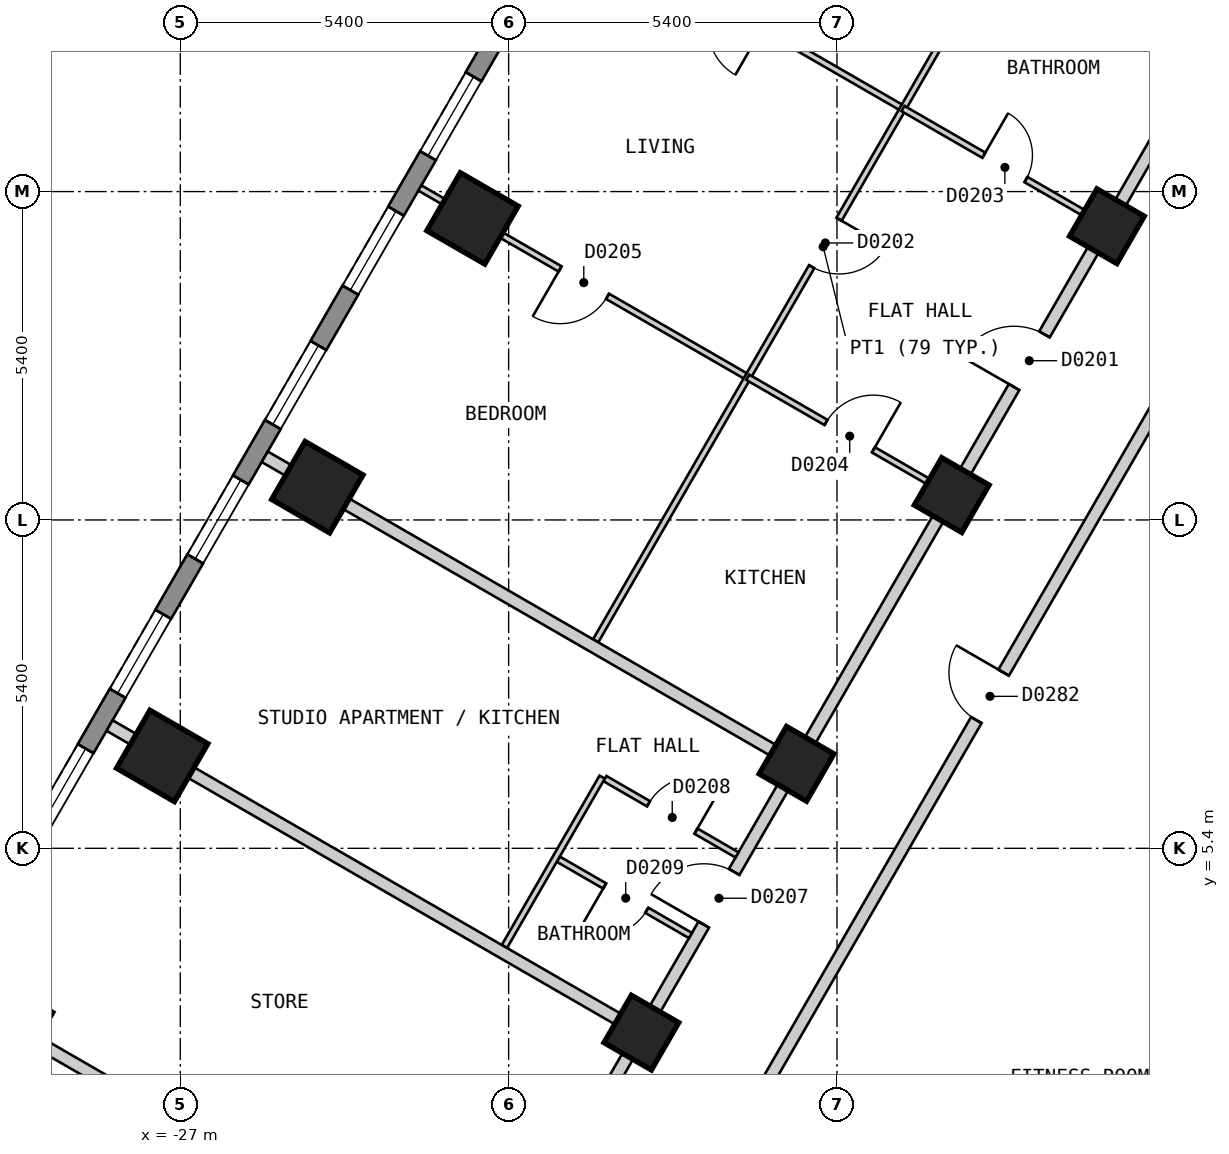
"""IFC4 building model, lengths in metres.
Left out: names, types, materials, properties, quantities, classifications, styles, units other than length and angle.
Written with IfcOpenShell. Run it as: python <this file> out.ifc"""

import sys

from ifc_helpers import new_model, si_unit, direction, frame, frame_2d, origin, origin_2d, place, context, subcontext, project, spatial, polyline, rectangle, outline, extrude, element, fill, save


model = new_model("IFC4")
c1 = context("Model", 3, precision=1e-05, world=origin(), true_north=direction((0.0, 1.0)))
c2 = subcontext(c1, "Body", "Model", "MODEL_VIEW")
j1 = project(units=[si_unit("LENGTHUNIT", "METRE"), si_unit("PLANEANGLEUNIT", "RADIAN")], contexts=[c1])
p1 = place(None, origin())
s1 = spatial("IfcSite", under=j1, at=p1, CompositionType="ELEMENT")
p2 = place(p1, origin())
s2 = spatial("IfcBuilding", under=s1, at=p2, CompositionType="ELEMENT")
p3 = place(p2, frame((0.0, 0.0, 47.4)))
s3 = spatial("IfcBuildingStorey", under=s2, at=p3, CompositionType="ELEMENT", Elevation=47.4)
for number, where, z_axis, x_axis in (
    (1, (-22.194, 15.759, 0.0), (0.0, 0.0, 1.0), (-0.5, -0.866, 0.0)),
    (2, (-24.746, 11.339, 0.0), (0.0, 0.0, 1.0), (-0.5, -0.866, 0.0)),
    (3, (-27.298, 6.919, 0.0), (0.0, 0.0, 1.0), (-0.5, -0.866, 0.0)),
    (4, (-29.849, 2.499, 0.0), (0.0, 0.0, 1.0), (-0.5, -0.866, 0.0)),
):
    element("IfcColumn", number, at=place(p3, frame(where, z_axis=z_axis, x_axis=x_axis)), inside=s3, PredefinedType="COLUMN", context=c2, shape_type="SweptSolid", body=[
        extrude(rectangle(XDim=1.1, YDim=1.1, at=origin_2d()), origin(), (0.0, 0.0, 1.0), 3.0),
    ])
for number, where, z_axis, x_axis in (
    (5, (-11.761, 15.63, 0.0), (0.0, 0.0, 1.0), (-0.5, -0.866, 0.0)),
    (6, (-14.313, 11.209, 0.0), (0.0, 0.0, 1.0), (-0.5, -0.866, 0.0)),
    (7, (-16.865, 6.789, 0.0), (0.0, 0.0, 1.0), (-0.5, -0.866, 0.0)),
    (8, (-19.417, 2.369, 0.0), (0.0, 0.0, 1.0), (-0.5, -0.866, 0.0)),
):
    element("IfcColumn", number, at=place(p3, frame(where, z_axis=z_axis, x_axis=x_axis)), inside=s3, PredefinedType="COLUMN", context=c2, shape_type="SweptSolid", body=[
        extrude(rectangle(XDim=0.9, YDim=0.9, at=origin_2d()), origin(), (0.0, 0.0, 1.0), 3.0),
    ])
p4 = place(p3, frame((-17.71, 25.825, 0.0), z_axis=(0.0, 0.0, 1.0), x_axis=(-0.500001938803, -0.866024284413, 0.0)))
e9 = element("IfcWall", 9, at=p4, inside=s3, PredefinedType="SOLIDWALL", context=c2, shape_type="SweptSolid", body=[
    extrude(outline(polyline([(0.0, -0.15), (27.02, -0.15), (26.94, 0.15), (0.08, 0.15), (0.0, -0.15)])), origin(), (0.0, 0.0, 1.0), 2.7),
])
p5 = place(p4, frame((1.277, 0.0, 0.15)))
e10 = element("IfcOpeningElement", 10, at=p5, cuts=e9, PredefinedType="OPENING", context=c2, shape_type="SweptSolid", body=[
    extrude(rectangle(XDim=1.5, YDim=2.1, at=frame_2d((0.75, 1.05))), frame((0.0, 0.16, 0.0), z_axis=(0.0, -1.0, 0.0), x_axis=(1.0, 0.0, 0.0)), (0.0, 0.0, 1.0), 0.32),
])
p6 = place(p4, frame((3.829, 0.0, 0.15)))
e11 = element("IfcOpeningElement", 11, at=p6, cuts=e9, PredefinedType="OPENING", context=c2, shape_type="SweptSolid", body=[
    extrude(rectangle(XDim=1.5, YDim=2.1, at=frame_2d((0.75, 1.05))), frame((0.0, 0.16, 0.0), z_axis=(0.0, -1.0, 0.0), x_axis=(1.0, 0.0, 0.0)), (0.0, 0.0, 1.0), 0.32),
])
p7 = place(p4, frame((6.382, 0.0, 0.15)))
e12 = element("IfcOpeningElement", 12, at=p7, cuts=e9, PredefinedType="OPENING", context=c2, shape_type="SweptSolid", body=[
    extrude(rectangle(XDim=1.5, YDim=2.1, at=frame_2d((0.75, 1.05))), frame((0.0, 0.16, 0.0), z_axis=(0.0, -1.0, 0.0), x_axis=(1.0, 0.0, 0.0)), (0.0, 0.0, 1.0), 0.32),
])
p8 = place(p4, frame((8.933, 0.0, 0.15)))
e13 = element("IfcOpeningElement", 13, at=p8, cuts=e9, PredefinedType="OPENING", context=c2, shape_type="SweptSolid", body=[
    extrude(rectangle(XDim=1.5, YDim=2.1, at=frame_2d((0.75, 1.05))), frame((0.0, 0.16, 0.0), z_axis=(0.0, -1.0, 0.0), x_axis=(1.0, 0.0, 0.0)), (0.0, 0.0, 1.0), 0.32),
])
p9 = place(p4, frame((11.485, 0.0, 0.15)))
e14 = element("IfcOpeningElement", 14, at=p9, cuts=e9, PredefinedType="OPENING", context=c2, shape_type="SweptSolid", body=[
    extrude(rectangle(XDim=1.5, YDim=2.1, at=frame_2d((0.75, 1.05))), frame((0.0, 0.16, 0.0), z_axis=(0.0, -1.0, 0.0), x_axis=(1.0, 0.0, 0.0)), (0.0, 0.0, 1.0), 0.32),
])
p10 = place(p4, frame((14.037, 0.0, 0.15)))
e15 = element("IfcOpeningElement", 15, at=p10, cuts=e9, PredefinedType="OPENING", context=c2, shape_type="SweptSolid", body=[
    extrude(rectangle(XDim=1.5, YDim=2.1, at=frame_2d((0.75, 1.05))), frame((0.0, 0.16, 0.0), z_axis=(0.0, -1.0, 0.0), x_axis=(1.0, 0.0, 0.0)), (0.0, 0.0, 1.0), 0.32),
])
p11 = place(p4, frame((16.589, 0.0, 0.15)))
e16 = element("IfcOpeningElement", 16, at=p11, cuts=e9, PredefinedType="OPENING", context=c2, shape_type="SweptSolid", body=[
    extrude(rectangle(XDim=1.5, YDim=2.1, at=frame_2d((0.75, 1.05))), frame((0.0, 0.16, 0.0), z_axis=(0.0, -1.0, 0.0), x_axis=(1.0, 0.0, 0.0)), (0.0, 0.0, 1.0), 0.32),
])
p12 = place(p4, frame((19.141, 0.0, 0.15)))
e17 = element("IfcOpeningElement", 17, at=p12, cuts=e9, PredefinedType="OPENING", context=c2, shape_type="SweptSolid", body=[
    extrude(rectangle(XDim=1.5, YDim=2.1, at=frame_2d((0.75, 1.05))), frame((0.0, 0.16, 0.0), z_axis=(0.0, -1.0, 0.0), x_axis=(1.0, 0.0, 0.0)), (0.0, 0.0, 1.0), 0.32),
])
p13 = place(p4, frame((21.693, 0.0, 0.15)))
e18 = element("IfcOpeningElement", 18, at=p13, cuts=e9, PredefinedType="OPENING", context=c2, shape_type="SweptSolid", body=[
    extrude(rectangle(XDim=1.5, YDim=2.1, at=frame_2d((0.75, 1.05))), frame((0.0, 0.16, 0.0), z_axis=(0.0, -1.0, 0.0), x_axis=(1.0, 0.0, 0.0)), (0.0, 0.0, 1.0), 0.32),
])
p14 = place(p4, frame((24.244, 0.0, 0.15)))
e19 = element("IfcOpeningElement", 19, at=p14, cuts=e9, PredefinedType="OPENING", context=c2, shape_type="SweptSolid", body=[
    extrude(rectangle(XDim=1.5, YDim=2.1, at=frame_2d((0.75, 1.05))), frame((0.0, 0.16, 0.0), z_axis=(0.0, -1.0, 0.0), x_axis=(1.0, 0.0, 0.0)), (0.0, 0.0, 1.0), 0.32),
])
p15 = place(p3, frame((-18.244, -0.001, 0.0), z_axis=(0.0, 0.0, 1.0), x_axis=(0.499962999376, 0.866046765051, 0.0)))
e20 = element("IfcWall", 20, at=p15, inside=s3, PredefinedType="PARTITIONING", context=c2, shape_type="SweptSolid", body=[
    extrude(rectangle(XDim=18.245, YDim=0.2, at=frame_2d((9.123, 0.0))), origin(), (0.0, 0.0, 1.0), 2.7),
])
p16 = place(p15, frame((8.672, 0.0, 0.0)))
e21 = element("IfcOpeningElement", 21, at=p16, cuts=e20, PredefinedType="OPENING", context=c2, shape_type="SweptSolid", body=[
    extrude(rectangle(XDim=0.9, YDim=2.1, at=frame_2d((0.45, 1.05))), frame((0.0, 0.11, 0.0), z_axis=(0.0, -1.0, 0.0), x_axis=(1.0, 0.0, 0.0)), (0.0, 0.0, 1.0), 0.22),
])
p17 = place(p3, frame((-20.727, 0.099, 0.0), z_axis=(0.0, 0.0, 1.0), x_axis=(0.499993204491, 0.866029327138, 0.0)))
e22 = element("IfcWall", 22, at=p17, inside=s3, PredefinedType="PARTITIONING", context=c2, shape_type="SweptSolid", body=[
    extrude(rectangle(XDim=20.554, YDim=0.2, at=frame_2d((10.277, 0.0))), origin(), (0.0, 0.0, 1.0), 2.7),
])
p18 = place(p17, frame((14.88, 0.0, 0.0)))
e23 = element("IfcOpeningElement", 23, at=p18, cuts=e22, PredefinedType="OPENING", context=c2, shape_type="SweptSolid", body=[
    extrude(rectangle(XDim=1.0, YDim=2.1, at=frame_2d((0.5, 1.05))), frame((0.0, 0.11, 0.0), z_axis=(0.0, -1.0, 0.0), x_axis=(1.0, 0.0, 0.0)), (0.0, 0.0, 1.0), 0.22),
])
p19 = place(p17, frame((4.673, 0.0, 0.0)))
e24 = element("IfcOpeningElement", 24, at=p19, cuts=e22, PredefinedType="OPENING", context=c2, shape_type="SweptSolid", body=[
    extrude(rectangle(XDim=1.0, YDim=2.1, at=frame_2d((0.5, 1.05))), frame((0.0, 0.11, 0.0), z_axis=(0.0, -1.0, 0.0), x_axis=(1.0, 0.0, 0.0)), (0.0, 0.0, 1.0), 0.22),
])
p20 = place(p17, frame((0.838, 0.0, 0.0)))
e25 = element("IfcOpeningElement", 25, at=p20, cuts=e22, PredefinedType="OPENING", context=c2, shape_type="SweptSolid", body=[
    extrude(rectangle(XDim=0.8, YDim=2.1, at=frame_2d((0.4, 1.05))), frame((0.0, 0.11, 0.0), z_axis=(0.0, -1.0, 0.0), x_axis=(1.0, 0.0, 0.0)), (0.0, 0.0, 1.0), 0.22),
])
p21 = place(p3, frame((-20.017, 6.547, 0.0), z_axis=(0.0, 0.0, 1.0), x_axis=(0.865940918122, -0.500146304917, 0.0)))
e26 = element("IfcWall", 26, at=p21, inside=s3, PredefinedType="PARTITIONING", context=c2, shape_type="SweptSolid", body=[
    extrude(rectangle(XDim=2.51, YDim=0.1, at=frame_2d((1.255, 0.0))), origin(), (0.0, 0.0, 1.0), 2.7),
])
p22 = place(p21, frame((0.829, 0.0, 0.0)))
e27 = element("IfcOpeningElement", 27, at=p22, cuts=e26, PredefinedType="OPENING", context=c2, shape_type="SweptSolid", body=[
    extrude(rectangle(XDim=0.9, YDim=2.1, at=frame_2d((0.45, 1.05))), frame((0.0, 0.06, 0.0), z_axis=(0.0, -1.0, 0.0), x_axis=(1.0, 0.0, 0.0)), (0.0, 0.0, 1.0), 0.12),
])
p23 = place(p3, frame((-20.783, 5.221, 0.0), z_axis=(0.0, 0.0, 1.0), x_axis=(0.865958718457, -0.500115484592, 0.0)))
e28 = element("IfcWall", 28, at=p23, inside=s3, PredefinedType="PARTITIONING", context=c2, shape_type="SweptSolid", body=[
    extrude(rectangle(XDim=2.509, YDim=0.1, at=frame_2d((1.255, 0.0))), origin(), (0.0, 0.0, 1.0), 2.7),
])
p24 = place(p23, frame((0.88, 0.0, 0.0)))
e29 = element("IfcOpeningElement", 29, at=p24, cuts=e28, PredefinedType="OPENING", context=c2, shape_type="SweptSolid", body=[
    extrude(rectangle(XDim=0.8, YDim=2.1, at=frame_2d((0.4, 1.05))), frame((0.0, 0.06, 0.0), z_axis=(0.0, -1.0, 0.0), x_axis=(1.0, 0.0, 0.0)), (0.0, 0.0, 1.0), 0.12),
])
p25 = place(p3, frame((-20.508, 20.679, 0.0), z_axis=(0.0, 0.0, 1.0), x_axis=(0.86607068519, -0.499921562103, 0.0)))
e30 = element("IfcWall", 30, at=p25, inside=s3, PredefinedType="PARTITIONING", context=c2, shape_type="SweptSolid", body=[
    extrude(rectangle(XDim=6.227, YDim=0.1, at=frame_2d((3.114, 0.0))), origin(), (0.0, 0.0, 1.0), 2.7),
])
p26 = place(p25, frame((2.663, 0.0, 0.0)))
e31 = element("IfcOpeningElement", 31, at=p26, cuts=e30, PredefinedType="OPENING", context=c2, shape_type="SweptSolid", body=[
    extrude(rectangle(XDim=0.9, YDim=2.1, at=frame_2d((0.45, 1.05))), frame((0.0, 0.06, 0.0), z_axis=(0.0, -1.0, 0.0), x_axis=(1.0, 0.0, 0.0)), (0.0, 0.0, 1.0), 0.12),
])
p27 = place(p3, frame((-23.06, 16.259, 0.0), z_axis=(0.0, 0.0, 1.0), x_axis=(0.86607068519, -0.499921562103, 0.0)))
e32 = element("IfcWall", 32, at=p27, inside=s3, PredefinedType="PARTITIONING", context=c2, shape_type="SweptSolid", body=[
    extrude(rectangle(XDim=6.227, YDim=0.1, at=frame_2d((3.114, 0.0))), origin(), (0.0, 0.0, 1.0), 2.7),
])
p28 = place(p27, frame((2.663, 0.0, 0.0)))
e33 = element("IfcOpeningElement", 33, at=p28, cuts=e32, PredefinedType="OPENING", context=c2, shape_type="SweptSolid", body=[
    extrude(rectangle(XDim=0.9, YDim=2.1, at=frame_2d((0.45, 1.05))), frame((0.0, 0.06, 0.0), z_axis=(0.0, -1.0, 0.0), x_axis=(1.0, 0.0, 0.0)), (0.0, 0.0, 1.0), 0.12),
])
p29 = place(p3, frame((-21.669, 3.787, 0.0), z_axis=(0.0, 0.0, 1.0), x_axis=(0.499913121084, 0.86607555754, 0.0)))
e34 = element("IfcWall", 34, at=p29, inside=s3, PredefinedType="PARTITIONING", context=c2, shape_type="SweptSolid", body=[
    extrude(rectangle(XDim=3.214, YDim=0.1, at=frame_2d((1.607, 0.0))), origin(), (0.0, 0.0, 1.0), 2.7),
])
p30 = place(p3, frame((-20.169, 8.812, 0.0), z_axis=(0.0, 0.0, 1.0), x_axis=(0.499995459772, 0.86602802507, 0.0)))
e35 = element("IfcWall", 35, at=p30, inside=s3, PredefinedType="PARTITIONING", context=c2, shape_type="SweptSolid", body=[
    extrude(rectangle(XDim=14.966, YDim=0.1, at=frame_2d((7.483, 0.0))), origin(), (0.0, 0.0, 1.0), 2.7),
])
p31 = place(p30, frame((7.105, 0.0, 0.0)))
e36 = element("IfcOpeningElement", 36, at=p31, cuts=e35, PredefinedType="OPENING", context=c2, shape_type="SweptSolid", body=[
    extrude(rectangle(XDim=0.9, YDim=2.1, at=frame_2d((0.45, 1.05))), frame((0.0, 0.06, 0.0), z_axis=(0.0, -1.0, 0.0), x_axis=(1.0, 0.0, 0.0)), (0.0, 0.0, 1.0), 0.12),
])
p32 = place(p3, frame((-12.659, 21.926, 0.0), z_axis=(0.0, 0.0, 1.0), x_axis=(0.500025458316, -0.86601070492, 0.0)))
e37 = element("IfcWall", 37, at=p32, inside=s3, PredefinedType="PARTITIONING", context=c2, shape_type="SweptSolid", body=[
    extrude(rectangle(XDim=4.533, YDim=0.2, at=frame_2d((2.267, 0.0))), origin(), (0.0, 0.0, 1.0), 2.7),
])
p33 = place(p3, frame((-28.163, 7.419, 0.0), z_axis=(0.0, 0.0, 1.0), x_axis=(0.866022959057, -0.500004234368, 0.0)))
e38 = element("IfcWall", 38, at=p33, inside=s3, PredefinedType="PARTITIONING", context=c2, shape_type="SweptSolid", body=[
    extrude(rectangle(XDim=10.0, YDim=0.2, at=frame_2d((5.0, 0.0))), origin(), (0.0, 0.0, 1.0), 2.7),
])
p34 = place(p3, frame((-30.716, 2.999, 0.0), z_axis=(0.0, 0.0, 1.0), x_axis=(0.866032775405, -0.499987231761, 0.0)))
e39 = element("IfcWall", 39, at=p34, inside=s3, PredefinedType="PARTITIONING", context=c2, shape_type="SweptSolid", body=[
    extrude(rectangle(XDim=5.8, YDim=0.2, at=frame_2d((2.9, 0.0))), origin(), (0.0, 0.0, 1.0), 2.7),
])
p35 = place(p3, frame((-25.611, 11.839, 0.0), z_axis=(0.0, 0.0, 1.0), x_axis=(0.866022959057, -0.500004234368, 0.0)))
e40 = element("IfcWall", 40, at=p35, inside=s3, PredefinedType="PARTITIONING", context=c2, shape_type="SweptSolid", body=[
    extrude(rectangle(XDim=10.0, YDim=0.2, at=frame_2d((5.0, 0.0))), origin(), (0.0, 0.0, 1.0), 2.7),
])
p36 = place(p3, frame((-15.115, 17.566, 0.0), z_axis=(0.0, 0.0, 1.0), x_axis=(0.866008894869, -0.50002859319, 0.0)))
e41 = element("IfcWall", 41, at=p36, inside=s3, PredefinedType="PARTITIONING", context=c2, shape_type="SweptSolid", body=[
    extrude(rectangle(XDim=3.774, YDim=0.1, at=frame_2d((1.887, 0.0))), origin(), (0.0, 0.0, 1.0), 2.7),
])
p37 = place(p36, frame((1.536, 0.0, 0.0)))
e42 = element("IfcOpeningElement", 42, at=p37, cuts=e41, PredefinedType="OPENING", context=c2, shape_type="SweptSolid", body=[
    extrude(rectangle(XDim=0.8, YDim=2.1, at=frame_2d((0.4, 1.05))), frame((0.0, 0.06, 0.0), z_axis=(0.0, -1.0, 0.0), x_axis=(1.0, 0.0, 0.0)), (0.0, 0.0, 1.0), 0.12),
])
p38 = place(p3, frame((-17.667, 13.146, 0.0), z_axis=(0.0, 0.0, 1.0), x_axis=(0.866008894869, -0.50002859319, 0.0)))
e43 = element("IfcWall", 43, at=p38, inside=s3, PredefinedType="PARTITIONING", context=c2, shape_type="SweptSolid", body=[
    extrude(rectangle(XDim=3.774, YDim=0.1, at=frame_2d((1.887, 0.0))), origin(), (0.0, 0.0, 1.0), 2.7),
])
p39 = place(p38, frame((1.486, 0.0, 0.0)))
e44 = element("IfcOpeningElement", 44, at=p39, cuts=e43, PredefinedType="OPENING", context=c2, shape_type="SweptSolid", body=[
    extrude(rectangle(XDim=0.9, YDim=2.1, at=frame_2d((0.45, 1.05))), frame((0.0, 0.06, 0.0), z_axis=(0.0, -1.0, 0.0), x_axis=(1.0, 0.0, 0.0)), (0.0, 0.0, 1.0), 0.12),
])
p40 = place(p8, origin())
e45 = element("IfcWindow", 45, at=p40, inside=s3, PartitioningType="SINGLE_PANEL", PredefinedType="WINDOW", context=c2, shape_type="SweptSolid", body=[
    extrude(rectangle(XDim=1.5, YDim=2.1, at=frame_2d((0.75, 1.05))), frame((0.0, 0.03, 0.0), z_axis=(0.0, -1.0, 0.0), x_axis=(1.0, 0.0, 0.0)), (0.0, 0.0, 1.0), 0.06),
])
fill(e13, e45)
p41 = place(p9, origin())
e46 = element("IfcWindow", 46, at=p41, inside=s3, PartitioningType="SINGLE_PANEL", PredefinedType="WINDOW", context=c2, shape_type="SweptSolid", body=[
    extrude(rectangle(XDim=1.5, YDim=2.1, at=frame_2d((0.75, 1.05))), frame((0.0, 0.03, 0.0), z_axis=(0.0, -1.0, 0.0), x_axis=(1.0, 0.0, 0.0)), (0.0, 0.0, 1.0), 0.06),
])
fill(e14, e46)
p42 = place(p10, origin())
e47 = element("IfcWindow", 47, at=p42, inside=s3, PartitioningType="SINGLE_PANEL", PredefinedType="WINDOW", context=c2, shape_type="SweptSolid", body=[
    extrude(rectangle(XDim=1.5, YDim=2.1, at=frame_2d((0.75, 1.05))), frame((0.0, 0.03, 0.0), z_axis=(0.0, -1.0, 0.0), x_axis=(1.0, 0.0, 0.0)), (0.0, 0.0, 1.0), 0.06),
])
fill(e15, e47)
p43 = place(p11, origin())
e48 = element("IfcWindow", 48, at=p43, inside=s3, PartitioningType="SINGLE_PANEL", PredefinedType="WINDOW", context=c2, shape_type="SweptSolid", body=[
    extrude(rectangle(XDim=1.5, YDim=2.1, at=frame_2d((0.75, 1.05))), frame((0.0, 0.03, 0.0), z_axis=(0.0, -1.0, 0.0), x_axis=(1.0, 0.0, 0.0)), (0.0, 0.0, 1.0), 0.06),
])
fill(e16, e48)
p44 = place(p12, origin())
e49 = element("IfcWindow", 49, at=p44, inside=s3, PartitioningType="SINGLE_PANEL", PredefinedType="WINDOW", context=c2, shape_type="SweptSolid", body=[
    extrude(rectangle(XDim=1.5, YDim=2.1, at=frame_2d((0.75, 1.05))), frame((0.0, 0.03, 0.0), z_axis=(0.0, -1.0, 0.0), x_axis=(1.0, 0.0, 0.0)), (0.0, 0.0, 1.0), 0.06),
])
fill(e17, e49)
p45 = place(p13, origin())
e50 = element("IfcWindow", 50, at=p45, inside=s3, PartitioningType="SINGLE_PANEL", PredefinedType="WINDOW", context=c2, shape_type="SweptSolid", body=[
    extrude(rectangle(XDim=1.5, YDim=2.1, at=frame_2d((0.75, 1.05))), frame((0.0, 0.03, 0.0), z_axis=(0.0, -1.0, 0.0), x_axis=(1.0, 0.0, 0.0)), (0.0, 0.0, 1.0), 0.06),
])
fill(e18, e50)
p46 = place(p18, origin())
e51 = element("IfcDoor", 51, at=p46, inside=s3, OperationType="SINGLE_SWING_LEFT", PredefinedType="DOOR", context=c2, shape_type="SweptSolid", body=[
    extrude(rectangle(XDim=1.0, YDim=2.1, at=frame_2d((0.5, 1.05))), frame((0.0, 0.025, 0.0), z_axis=(0.0, -1.0, 0.0), x_axis=(1.0, 0.0, 0.0)), (0.0, 0.0, 1.0), 0.05),
])
fill(e23, e51)
p47 = place(p31, origin())
e52 = element("IfcDoor", 52, at=p47, inside=s3, OperationType="SINGLE_SWING_RIGHT", PredefinedType="DOOR", context=c2, shape_type="SweptSolid", body=[
    extrude(rectangle(XDim=0.9, YDim=2.1, at=frame_2d((0.45, 1.05))), frame((0.0, 0.025, 0.0), z_axis=(0.0, -1.0, 0.0), x_axis=(1.0, 0.0, 0.0)), (0.0, 0.0, 1.0), 0.05),
])
fill(e36, e52)
p48 = place(p37, origin())
e53 = element("IfcDoor", 53, at=p48, inside=s3, OperationType="SINGLE_SWING_LEFT", PredefinedType="DOOR", context=c2, shape_type="SweptSolid", body=[
    extrude(rectangle(XDim=0.8, YDim=2.1, at=frame_2d((0.4, 1.05))), frame((0.0, 0.025, 0.0), z_axis=(0.0, -1.0, 0.0), x_axis=(1.0, 0.0, 0.0)), (0.0, 0.0, 1.0), 0.05),
])
fill(e42, e53)
p49 = place(p39, origin())
e54 = element("IfcDoor", 54, at=p49, inside=s3, OperationType="SINGLE_SWING_RIGHT", PredefinedType="DOOR", context=c2, shape_type="SweptSolid", body=[
    extrude(rectangle(XDim=0.9, YDim=2.1, at=frame_2d((0.45, 1.05))), frame((0.0, 0.025, 0.0), z_axis=(0.0, -1.0, 0.0), x_axis=(1.0, 0.0, 0.0)), (0.0, 0.0, 1.0), 0.05),
])
fill(e44, e54)
p50 = place(p28, origin())
e55 = element("IfcDoor", 55, at=p50, inside=s3, OperationType="SINGLE_SWING_LEFT", PredefinedType="DOOR", context=c2, shape_type="SweptSolid", body=[
    extrude(rectangle(XDim=0.9, YDim=2.1, at=frame_2d((0.45, 1.05))), frame((0.0, 0.025, 0.0), z_axis=(0.0, -1.0, 0.0), x_axis=(1.0, 0.0, 0.0)), (0.0, 0.0, 1.0), 0.05),
])
fill(e33, e55)
p51 = place(p19, origin())
e56 = element("IfcDoor", 56, at=p51, inside=s3, OperationType="SINGLE_SWING_LEFT", PredefinedType="DOOR", context=c2, shape_type="SweptSolid", body=[
    extrude(rectangle(XDim=1.0, YDim=2.1, at=frame_2d((0.5, 1.05))), frame((0.0, 0.025, 0.0), z_axis=(0.0, -1.0, 0.0), x_axis=(1.0, 0.0, 0.0)), (0.0, 0.0, 1.0), 0.05),
])
fill(e24, e56)
p52 = place(p22, origin())
e57 = element("IfcDoor", 57, at=p52, inside=s3, OperationType="SINGLE_SWING_RIGHT", PredefinedType="DOOR", context=c2, shape_type="SweptSolid", body=[
    extrude(rectangle(XDim=0.9, YDim=2.1, at=frame_2d((0.45, 1.05))), frame((0.0, 0.025, 0.0), z_axis=(0.0, -1.0, 0.0), x_axis=(1.0, 0.0, 0.0)), (0.0, 0.0, 1.0), 0.05),
])
fill(e27, e57)
p53 = place(p24, origin())
e58 = element("IfcDoor", 58, at=p53, inside=s3, OperationType="SINGLE_SWING_LEFT", PredefinedType="DOOR", context=c2, shape_type="SweptSolid", body=[
    extrude(rectangle(XDim=0.8, YDim=2.1, at=frame_2d((0.4, 1.05))), frame((0.0, 0.025, 0.0), z_axis=(0.0, -1.0, 0.0), x_axis=(1.0, 0.0, 0.0)), (0.0, 0.0, 1.0), 0.05),
])
fill(e29, e58)
p54 = place(p16, origin())
e59 = element("IfcDoor", 59, at=p54, inside=s3, OperationType="SINGLE_SWING_RIGHT", PredefinedType="DOOR", context=c2, shape_type="SweptSolid", body=[
    extrude(rectangle(XDim=0.9, YDim=2.1, at=frame_2d((0.45, 1.05))), frame((0.0, 0.025, 0.0), z_axis=(0.0, -1.0, 0.0), x_axis=(1.0, 0.0, 0.0)), (0.0, 0.0, 1.0), 0.05),
])
fill(e21, e59)
save(model, sys.argv[1])
